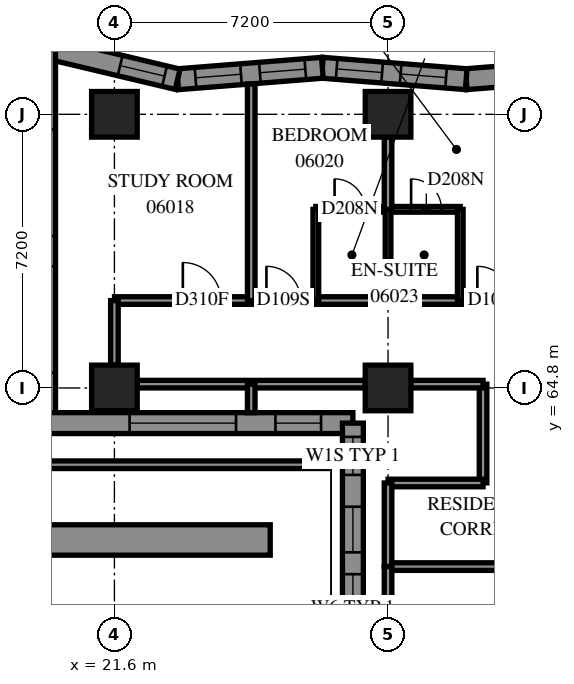
"""IFC4 building model, lengths in metres.
Left out: names, types, materials, properties, quantities, classifications, styles, units other than length and angle.
Written with IfcOpenShell. Run it as: python <this file> out.ifc"""

import sys

from ifc_helpers import new_model, si_unit, direction, frame, frame_2d, origin, origin_2d, place, context, subcontext, project, spatial, polyline, rectangle, outline, extrude, element, fill, save


model = new_model("IFC4")
c1 = context("Model", 3, precision=1e-05, world=origin(), true_north=direction((0.0, 1.0)))
c2 = subcontext(c1, "Body", "Model", "MODEL_VIEW")
j1 = project(units=[si_unit("LENGTHUNIT", "METRE"), si_unit("PLANEANGLEUNIT", "RADIAN")], contexts=[c1])
p1 = place(None, origin())
s1 = spatial("IfcSite", under=j1, at=p1, CompositionType="ELEMENT")
p2 = place(p1, origin())
s2 = spatial("IfcBuilding", under=s1, at=p2, CompositionType="ELEMENT")
p3 = place(p2, frame((0.0, 0.0, 27.0)))
s3 = spatial("IfcBuildingStorey", under=s2, at=p3, CompositionType="ELEMENT", Elevation=27.0)
for number, where, z_axis, x_axis in (
    (1, (21.6, 64.8, 0.0), (0.0, 0.0, 1.0), (1.0, 0.0, 0.0)),
    (2, (21.6, 72.0, 0.0), (0.0, 0.0, 1.0), (1.0, 0.0, 0.0)),
    (3, (28.8, 64.8, 0.0), (0.0, 0.0, 1.0), (1.0, 0.0, 0.0)),
    (4, (28.8, 72.0, 0.0), (0.0, 0.0, 1.0), (1.0, 0.0, 0.0)),
):
    element("IfcColumn", number, at=place(p3, frame(where, z_axis=z_axis, x_axis=x_axis)), inside=s3, PredefinedType="COLUMN", context=c2, shape_type="SweptSolid", body=[
        extrude(rectangle(XDim=1.2, YDim=1.2, at=origin_2d()), origin(), (0.0, 0.0, 1.0), 3.1),
    ])
p4 = place(p3, frame((34.642, 73.224, 0.0), z_axis=(0.0, 0.0, 1.0), x_axis=(-0.9968746163, -0.078999996, 0.0)))
e5 = element("IfcWall", 5, at=p4, inside=s3, PredefinedType="SOLIDWALL", context=c2, shape_type="SweptSolid", body=[
    extrude(outline(polyline([(-0.022, -0.275), (3.776, -0.275), (3.819, 0.275), (0.022, 0.275), (-0.022, -0.275)])), origin(), (0.0, 0.0, 1.0), 3.1),
])
p5 = place(p4, frame((0.636, 0.0, 0.5)))
e6 = element("IfcOpeningElement", 6, at=p5, cuts=e5, PredefinedType="OPENING", context=c2, shape_type="SweptSolid", body=[
    extrude(rectangle(XDim=1.2, YDim=2.45, at=frame_2d((0.6, 1.225))), frame((0.0, 0.285, 0.0), z_axis=(0.0, -1.0, 0.0), x_axis=(1.0, 0.0, 0.0)), (0.0, 0.0, 1.0), 0.57),
])
p6 = place(p3, frame((30.857, 72.924, 0.0), z_axis=(0.0, 0.0, 1.0), x_axis=(-0.9968747806, 0.0789979222, 0.0)))
e7 = element("IfcWall", 7, at=p6, inside=s3, PredefinedType="SOLIDWALL", context=c2, shape_type="SweptSolid", body=[
    extrude(outline(polyline([(0.022, -0.275), (3.819, -0.275), (3.776, 0.275), (-0.022, 0.275), (0.022, -0.275)])), origin(), (0.0, 0.0, 1.0), 3.1),
])
p7 = place(p6, frame((0.532, 0.0, 0.5)))
e8 = element("IfcOpeningElement", 8, at=p7, cuts=e7, PredefinedType="OPENING", context=c2, shape_type="SweptSolid", body=[
    extrude(rectangle(XDim=1.2, YDim=2.45, at=frame_2d((0.6, 1.225))), frame((0.0, 0.285, 0.0), z_axis=(0.0, -1.0, 0.0), x_axis=(1.0, 0.0, 0.0)), (0.0, 0.0, 1.0), 0.57),
])
p8 = place(p6, frame((2.22, 0.0, 0.5)))
e9 = element("IfcOpeningElement", 9, at=p8, cuts=e7, PredefinedType="OPENING", context=c2, shape_type="SweptSolid", body=[
    extrude(rectangle(XDim=1.2, YDim=2.45, at=frame_2d((0.6, 1.225))), frame((0.0, 0.285, 0.0), z_axis=(0.0, -1.0, 0.0), x_axis=(1.0, 0.0, 0.0)), (0.0, 0.0, 1.0), 0.57),
])
p9 = place(p3, frame((27.071, 73.224, 0.0), z_axis=(0.0, 0.0, 1.0), x_axis=(-0.9968745318, -0.0790010628, 0.0)))
e10 = element("IfcWall", 10, at=p9, inside=s3, PredefinedType="SOLIDWALL", context=c2, shape_type="SweptSolid", body=[
    extrude(outline(polyline([(-0.022, -0.275), (3.776, -0.275), (3.862, 0.275), (0.022, 0.275), (-0.022, -0.275)])), origin(), (0.0, 0.0, 1.0), 3.1),
])
p10 = place(p9, frame((0.449, 0.0, 0.5)))
e11 = element("IfcOpeningElement", 11, at=p10, cuts=e10, PredefinedType="OPENING", context=c2, shape_type="SweptSolid", body=[
    extrude(rectangle(XDim=1.2, YDim=2.45, at=frame_2d((0.6, 1.225))), frame((0.0, 0.285, 0.0), z_axis=(0.0, -1.0, 0.0), x_axis=(1.0, 0.0, 0.0)), (0.0, 0.0, 1.0), 0.57),
])
p11 = place(p9, frame((2.148, 0.0, 0.5)))
e12 = element("IfcOpeningElement", 12, at=p11, cuts=e10, PredefinedType="OPENING", context=c2, shape_type="SweptSolid", body=[
    extrude(rectangle(XDim=1.2, YDim=2.45, at=frame_2d((0.6, 1.225))), frame((0.0, 0.285, 0.0), z_axis=(0.0, -1.0, 0.0), x_axis=(1.0, 0.0, 0.0)), (0.0, 0.0, 1.0), 0.57),
])
p12 = place(p3, frame((23.264, 72.922, 0.0), z_axis=(0.0, 0.0, 1.0), x_axis=(-0.9728791637, 0.231313927, 0.0)))
e13 = element("IfcWall", 13, at=p12, inside=s3, PredefinedType="SOLIDWALL", context=c2, shape_type="SweptSolid", body=[
    extrude(outline(polyline([(0.043, -0.275), (3.934, -0.275), (3.238, 0.275), (-0.043, 0.275), (0.043, -0.275)])), origin(), (0.0, 0.0, 1.0), 3.1),
])
p13 = place(p12, frame((0.355, 0.0, 0.5)))
e14 = element("IfcOpeningElement", 14, at=p13, cuts=e13, PredefinedType="OPENING", context=c2, shape_type="SweptSolid", body=[
    extrude(rectangle(XDim=1.2, YDim=2.45, at=frame_2d((0.6, 1.225))), frame((0.0, 0.285, 0.0), z_axis=(0.0, -1.0, 0.0), x_axis=(1.0, 0.0, 0.0)), (0.0, 0.0, 1.0), 0.57),
])
p14 = place(p3, frame((19.775, 73.752, 0.0), z_axis=(0.0, 0.0, 1.0), x_axis=(0.0, -1.0, 0.0)))
e15 = element("IfcWall", 15, at=p14, inside=s3, PredefinedType="SOLIDWALL", context=c2, shape_type="SweptSolid", body=[
    extrude(outline(polyline([(-0.348, -0.275), (10.152, -0.275), (9.602, 0.275), (0.348, 0.275), (-0.348, -0.275)])), origin(), (0.0, 0.0, 1.0), 3.1),
])
p15 = place(p14, frame((2.152, 0.0, 0.5)))
e16 = element("IfcOpeningElement", 16, at=p15, cuts=e15, PredefinedType="OPENING", context=c2, shape_type="SweptSolid", body=[
    extrude(rectangle(XDim=2.8, YDim=2.45, at=frame_2d((1.4, 1.225))), frame((0.0, 0.285, 0.0), z_axis=(0.0, -1.0, 0.0), x_axis=(1.0, 0.0, 0.0)), (0.0, 0.0, 1.0), 0.57),
])
p16 = place(p14, frame((5.752, 0.0, 0.5)))
e17 = element("IfcOpeningElement", 17, at=p16, cuts=e15, PredefinedType="OPENING", context=c2, shape_type="SweptSolid", body=[
    extrude(rectangle(XDim=2.8, YDim=2.45, at=frame_2d((1.4, 1.225))), frame((0.0, 0.285, 0.0), z_axis=(0.0, -1.0, 0.0), x_axis=(1.0, 0.0, 0.0)), (0.0, 0.0, 1.0), 0.57),
])
p17 = place(p3, frame((19.775, 63.875, 0.0), z_axis=(0.0, 0.0, 1.0), x_axis=(1.0, 0.0, 0.0)))
e18 = element("IfcWall", 18, at=p17, inside=s3, PredefinedType="SOLIDWALL", context=c2, shape_type="SweptSolid", body=[
    extrude(outline(polyline([(-0.275, -0.275), (7.825, -0.275), (8.375, 0.275), (0.275, 0.275), (-0.275, -0.275)])), origin(), (0.0, 0.0, 1.0), 3.1),
])
p18 = place(p17, frame((2.225, 0.0, 0.5)))
e19 = element("IfcOpeningElement", 19, at=p18, cuts=e18, PredefinedType="OPENING", context=c2, shape_type="SweptSolid", body=[
    extrude(rectangle(XDim=2.8, YDim=2.45, at=frame_2d((1.4, 1.225))), frame((0.0, 0.285, 0.0), z_axis=(0.0, -1.0, 0.0), x_axis=(1.0, 0.0, 0.0)), (0.0, 0.0, 1.0), 0.57),
])
p19 = place(p17, frame((6.062, 0.0, 0.5)))
e20 = element("IfcOpeningElement", 20, at=p19, cuts=e18, PredefinedType="OPENING", context=c2, shape_type="SweptSolid", body=[
    extrude(rectangle(XDim=1.2, YDim=2.45, at=frame_2d((0.6, 1.225))), frame((0.0, 0.285, 0.0), z_axis=(0.0, -1.0, 0.0), x_axis=(1.0, 0.0, 0.0)), (0.0, 0.0, 1.0), 0.57),
])
p20 = place(p3, frame((27.875, 63.875, 0.0), z_axis=(0.0, 0.0, 1.0), x_axis=(0.0, -1.0, 0.0)))
e21 = element("IfcWall", 21, at=p20, inside=s3, PredefinedType="SOLIDWALL", context=c2, shape_type="SweptSolid", body=[
    extrude(outline(polyline([(0.275, -0.275), (7.475, -0.275), (6.925, 0.275), (-0.275, 0.275), (0.275, -0.275)])), origin(), (0.0, 0.0, 1.0), 3.1),
])
p21 = place(p20, frame((3.975, 0.0, 0.7)))
e22 = element("IfcOpeningElement", 22, at=p21, cuts=e21, PredefinedType="OPENING", context=c2, shape_type="SweptSolid", body=[
    extrude(rectangle(XDim=1.8, YDim=2.2, at=frame_2d((0.9, 1.1))), frame((0.0, 0.285, 0.0), z_axis=(0.0, -1.0, 0.0), x_axis=(1.0, 0.0, 0.0)), (0.0, 0.0, 1.0), 0.57),
])
p22 = place(p20, frame((0.362, 0.0, 0.45)))
e23 = element("IfcOpeningElement", 23, at=p22, cuts=e21, PredefinedType="OPENING", context=c2, shape_type="SweptSolid", body=[
    extrude(rectangle(XDim=1.0, YDim=2.5, at=frame_2d((0.5, 1.25))), frame((0.0, 0.285, 0.0), z_axis=(0.0, -1.0, 0.0), x_axis=(1.0, 0.0, 0.0)), (0.0, 0.0, 1.0), 0.57),
])
p23 = place(p20, frame((2.2, 0.0, 0.5)))
e24 = element("IfcOpeningElement", 24, at=p23, cuts=e21, PredefinedType="OPENING", context=c2, shape_type="SweptSolid", body=[
    extrude(rectangle(XDim=1.2, YDim=2.45, at=frame_2d((0.6, 1.225))), frame((0.0, 0.285, 0.0), z_axis=(0.0, -1.0, 0.0), x_axis=(1.0, 0.0, 0.0)), (0.0, 0.0, 1.0), 0.57),
])
p24 = place(p3, frame((28.8, 60.1, 0.0), z_axis=(0.0, 0.0, 1.0), x_axis=(1.0, 0.0, 0.0)))
e25 = element("IfcWall", 25, at=p24, inside=s3, PredefinedType="PARTITIONING", context=c2, shape_type="SweptSolid", body=[
    extrude(rectangle(XDim=24.1, YDim=0.2, at=frame_2d((12.05, 0.0))), origin(), (0.0, 0.0, 1.0), 3.1),
])
p25 = place(p24, frame((4.125, 0.0, 0.0)))
e26 = element("IfcOpeningElement", 26, at=p25, cuts=e25, PredefinedType="OPENING", context=c2, shape_type="SweptSolid", body=[
    extrude(rectangle(XDim=1.0, YDim=2.1, at=frame_2d((0.5, 1.05))), frame((0.0, 0.11, 0.0), z_axis=(0.0, -1.0, 0.0), x_axis=(1.0, 0.0, 0.0)), (0.0, 0.0, 1.0), 0.22),
])
p26 = place(p24, frame((11.62, 0.0, 0.0)))
e27 = element("IfcOpeningElement", 27, at=p26, cuts=e25, PredefinedType="OPENING", context=c2, shape_type="SweptSolid", body=[
    extrude(rectangle(XDim=0.9, YDim=2.1, at=frame_2d((0.45, 1.05))), frame((0.0, 0.11, 0.0), z_axis=(0.0, -1.0, 0.0), x_axis=(1.0, 0.0, 0.0)), (0.0, 0.0, 1.0), 0.22),
])
p27 = place(p24, frame((14.8, 0.0, 0.0)))
e28 = element("IfcOpeningElement", 28, at=p27, cuts=e25, PredefinedType="OPENING", context=c2, shape_type="SweptSolid", body=[
    extrude(rectangle(XDim=0.9, YDim=2.1, at=frame_2d((0.45, 1.05))), frame((0.0, 0.11, 0.0), z_axis=(0.0, -1.0, 0.0), x_axis=(1.0, 0.0, 0.0)), (0.0, 0.0, 1.0), 0.22),
])
p28 = place(p24, frame((18.835, 0.0, 0.0)))
e29 = element("IfcOpeningElement", 29, at=p28, cuts=e25, PredefinedType="OPENING", context=c2, shape_type="SweptSolid", body=[
    extrude(rectangle(XDim=1.0, YDim=2.1, at=frame_2d((0.5, 1.05))), frame((0.0, 0.11, 0.0), z_axis=(0.0, -1.0, 0.0), x_axis=(1.0, 0.0, 0.0)), (0.0, 0.0, 1.0), 0.22),
])
p29 = place(p24, frame((22.854, 0.0, 0.0)))
e30 = element("IfcOpeningElement", 30, at=p29, cuts=e25, PredefinedType="OPENING", context=c2, shape_type="SweptSolid", body=[
    extrude(rectangle(XDim=1.0, YDim=2.1, at=frame_2d((0.5, 1.05))), frame((0.0, 0.11, 0.0), z_axis=(0.0, -1.0, 0.0), x_axis=(1.0, 0.0, 0.0)), (0.0, 0.0, 1.0), 0.22),
])
p30 = place(p3, frame((21.602, 67.1, 0.0), z_axis=(0.0, 0.0, 1.0), x_axis=(1.0, 0.0, 0.0)))
e31 = element("IfcWall", 31, at=p30, inside=s3, PredefinedType="PARTITIONING", context=c2, shape_type="SweptSolid", body=[
    extrude(rectangle(XDim=11.898, YDim=0.2, at=frame_2d((5.949, 0.0))), origin(), (0.0, 0.0, 1.0), 3.1),
])
p31 = place(p30, frame((1.798, 0.0, 0.0)))
e32 = element("IfcOpeningElement", 32, at=p31, cuts=e31, PredefinedType="OPENING", context=c2, shape_type="SweptSolid", body=[
    extrude(rectangle(XDim=1.0, YDim=2.1, at=frame_2d((0.5, 1.05))), frame((0.0, 0.11, 0.0), z_axis=(0.0, -1.0, 0.0), x_axis=(1.0, 0.0, 0.0)), (0.0, 0.0, 1.0), 0.22),
])
p32 = place(p30, frame((3.998, 0.0, 0.0)))
e33 = element("IfcOpeningElement", 33, at=p32, cuts=e31, PredefinedType="OPENING", context=c2, shape_type="SweptSolid", body=[
    extrude(rectangle(XDim=0.9, YDim=2.1, at=frame_2d((0.45, 1.05))), frame((0.0, 0.11, 0.0), z_axis=(0.0, -1.0, 0.0), x_axis=(1.0, 0.0, 0.0)), (0.0, 0.0, 1.0), 0.22),
])
p33 = place(p30, frame((9.548, 0.0, 0.0)))
e34 = element("IfcOpeningElement", 34, at=p33, cuts=e31, PredefinedType="OPENING", context=c2, shape_type="SweptSolid", body=[
    extrude(rectangle(XDim=0.9, YDim=2.1, at=frame_2d((0.45, 1.05))), frame((0.0, 0.11, 0.0), z_axis=(0.0, -1.0, 0.0), x_axis=(1.0, 0.0, 0.0)), (0.0, 0.0, 1.0), 0.22),
])
p34 = place(p3, frame((22.2, 64.9, 0.0), z_axis=(0.0, 0.0, 1.0), x_axis=(1.0, 0.0, 0.0)))
e35 = element("IfcWall", 35, at=p34, inside=s3, PredefinedType="PARTITIONING", context=c2, shape_type="SweptSolid", body=[
    extrude(rectangle(XDim=6.0, YDim=0.2, at=frame_2d((3.0, 0.0))), origin(), (0.0, 0.0, 1.0), 2.6),
])
p35 = place(p3, frame((25.2, 67.1, 0.0), z_axis=(0.0, 0.0, 1.0), x_axis=(0.0, 1.0, 0.0)))
e36 = element("IfcWall", 36, at=p35, inside=s3, PredefinedType="PARTITIONING", context=c2, shape_type="SweptSolid", body=[
    extrude(rectangle(XDim=5.7, YDim=0.2, at=frame_2d((2.85, 0.0))), origin(), (0.0, 0.0, 1.0), 3.1),
])
p36 = place(p3, frame((26.9, 69.5, 0.0), z_axis=(0.0, 0.0, 1.0), x_axis=(1.0, 0.0, 0.0)))
e37 = element("IfcWall", 37, at=p36, inside=s3, PredefinedType="PARTITIONING", context=c2, shape_type="SweptSolid", body=[
    extrude(rectangle(XDim=3.8, YDim=0.15, at=frame_2d((1.9, 0.0))), origin(), (0.0, 0.0, 1.0), 3.1),
])
p37 = place(p36, frame((0.493, 0.0, 0.0)))
e38 = element("IfcOpeningElement", 38, at=p37, cuts=e37, PredefinedType="OPENING", context=c2, shape_type="SweptSolid", body=[
    extrude(rectangle(XDim=0.8, YDim=2.1, at=frame_2d((0.4, 1.05))), frame((0.0, 0.085, 0.0), z_axis=(0.0, -1.0, 0.0), x_axis=(1.0, 0.0, 0.0)), (0.0, 0.0, 1.0), 0.17),
])
p38 = place(p36, frame((2.507, 0.0, 0.0)))
e39 = element("IfcOpeningElement", 39, at=p38, cuts=e37, PredefinedType="OPENING", context=c2, shape_type="SweptSolid", body=[
    extrude(rectangle(XDim=0.8, YDim=2.1, at=frame_2d((0.4, 1.05))), frame((0.0, 0.085, 0.0), z_axis=(0.0, -1.0, 0.0), x_axis=(1.0, 0.0, 0.0)), (0.0, 0.0, 1.0), 0.17),
])
p39 = place(p3, frame((31.3, 62.302, 0.0), z_axis=(0.0, 0.0, 1.0), x_axis=(0.0, 1.0, 0.0)))
e40 = element("IfcWall", 40, at=p39, inside=s3, PredefinedType="PARTITIONING", context=c2, shape_type="SweptSolid", body=[
    extrude(rectangle(XDim=2.598, YDim=0.2, at=frame_2d((1.299, 0.0))), origin(), (0.0, 0.0, 1.0), 3.1),
])
p40 = place(p3, frame((28.802, 62.3, 0.0), z_axis=(0.0, 0.0, 1.0), x_axis=(1.0, 0.0, 0.0)))
e41 = element("IfcWall", 41, at=p40, inside=s3, PredefinedType="PARTITIONING", context=c2, shape_type="SweptSolid", body=[
    extrude(rectangle(XDim=2.498, YDim=0.2, at=frame_2d((1.249, 0.0))), origin(), (0.0, 0.0, 1.0), 3.1),
])
for number, where, z_axis, x_axis in (
    (42, (26.9, 67.1, 0.0), (0.0, 0.0, 1.0), (0.0, 1.0, 0.0)),
    (43, (28.8, 67.1, 0.0), (0.0, 0.0, 1.0), (0.0, 1.0, 0.0)),
    (44, (30.7, 67.1, 0.0), (0.0, 0.0, 1.0), (0.0, 1.0, 0.0)),
):
    element("IfcWall", number, at=place(p3, frame(where, z_axis=z_axis, x_axis=x_axis)), inside=s3, PredefinedType="PARTITIONING", context=c2, shape_type="SweptSolid", body=[
        extrude(rectangle(XDim=2.4, YDim=0.15, at=frame_2d((1.2, 0.0))), origin(), (0.0, 0.0, 1.0), 3.1),
    ])
p41 = place(p3, frame((28.8, 60.1, 0.0), z_axis=(0.0, 0.0, 1.0), x_axis=(0.0, 1.0, 0.0)))
e45 = element("IfcWall", 45, at=p41, inside=s3, PredefinedType="PARTITIONING", context=c2, shape_type="SweptSolid", body=[
    extrude(rectangle(XDim=2.2, YDim=0.2, at=frame_2d((1.1, 0.0))), origin(), (0.0, 0.0, 1.0), 2.6),
])
for number, where, z_axis, x_axis in (
    (46, (28.8, 69.5, 0.0), (0.0, 0.0, 1.0), (0.0, 1.0, 0.0)),
    (47, (29.4, 64.9, 0.0), (0.0, 0.0, 1.0), (1.0, 0.0, 0.0)),
):
    element("IfcWall", number, at=place(p3, frame(where, z_axis=z_axis, x_axis=x_axis)), inside=s3, PredefinedType="PARTITIONING", context=c2, shape_type="SweptSolid", body=[
        extrude(rectangle(XDim=1.9, YDim=0.2, at=frame_2d((0.95, 0.0))), origin(), (0.0, 0.0, 1.0), 3.1),
    ])
p42 = place(p3, frame((28.8, 58.2, 0.0), z_axis=(0.0, 0.0, 1.0), x_axis=(0.0, 1.0, 0.0)))
e48 = element("IfcWall", 48, at=p42, inside=s3, PredefinedType="PARTITIONING", context=c2, shape_type="SweptSolid", body=[
    extrude(rectangle(XDim=1.9, YDim=0.2, at=frame_2d((0.95, 0.0))), origin(), (0.0, 0.0, 1.0), 2.6),
])
p43 = place(p3, frame((21.6, 65.4, 0.0), z_axis=(0.0, 0.0, 1.0), x_axis=(0.0, 1.0, 0.0)))
e49 = element("IfcWall", 49, at=p43, inside=s3, PredefinedType="PARTITIONING", context=c2, shape_type="SweptSolid", body=[
    extrude(rectangle(XDim=1.698, YDim=0.2, at=frame_2d((0.849, 0.0))), origin(), (0.0, 0.0, 1.0), 2.6),
])
p44 = place(p3, frame((25.2, 64.15, 0.0), z_axis=(0.0, 0.0, 1.0), x_axis=(0.0, 1.0, 0.0)))
e50 = element("IfcWall", 50, at=p44, inside=s3, PredefinedType="PARTITIONING", context=c2, shape_type="SweptSolid", body=[
    extrude(rectangle(XDim=0.75, YDim=0.2, at=frame_2d((0.375, 0.0))), origin(), (0.0, 0.0, 1.0), 3.1),
])
p45 = place(p3, frame((28.2, 64.9, 0.0), z_axis=(0.0, 0.0, 1.0), x_axis=(1.0, 0.0, 0.0)))
e51 = element("IfcWall", 51, at=p45, inside=s3, PredefinedType="PARTITIONING", context=c2, shape_type="SweptSolid", body=[
    extrude(rectangle(XDim=1.2, YDim=0.2, at=frame_2d((0.6, 0.0))), origin(), (0.0, 0.0, 1.0), 3.1),
])
p46 = place(p3, frame((18.68, 62.78, 0.0), z_axis=(0.0, 0.0, 1.0), x_axis=(1.0, 0.0, 0.0)))
e52 = element("IfcWall", 52, at=p46, inside=s3, PredefinedType="PARAPET", context=c2, shape_type="SweptSolid", body=[
    extrude(rectangle(XDim=8.52, YDim=0.2, at=frame_2d((4.26, 0.0))), origin(), (0.0, 0.0, 1.0), 0.9),
])
p47 = place(p3, frame((0.4, 60.8, 0.0), z_axis=(0.0, 0.0, 1.0), x_axis=(1.0, 0.0, 0.0)))
e53 = element("IfcWall", 53, at=p47, inside=s3, PredefinedType="SOLIDWALL", context=c2, shape_type="SweptSolid", body=[
    extrude(rectangle(XDim=25.3, YDim=0.8, at=frame_2d((12.65, 0.0))), origin(), (0.0, 0.0, 1.0), 0.6),
])
p48 = place(p7, origin())
e54 = element("IfcWindow", 54, at=p48, inside=s3, PartitioningType="SINGLE_PANEL", PredefinedType="WINDOW", context=c2, shape_type="SweptSolid", body=[
    extrude(rectangle(XDim=1.2, YDim=2.45, at=frame_2d((0.6, 1.225))), frame((0.0, 0.155, 0.0), z_axis=(0.0, -1.0, 0.0), x_axis=(1.0, 0.0, 0.0)), (0.0, 0.0, 1.0), 0.06),
])
fill(e8, e54)
p49 = place(p8, origin())
e55 = element("IfcWindow", 55, at=p49, inside=s3, PartitioningType="SINGLE_PANEL", PredefinedType="WINDOW", context=c2, shape_type="SweptSolid", body=[
    extrude(rectangle(XDim=1.2, YDim=2.45, at=frame_2d((0.6, 1.225))), frame((0.0, 0.155, 0.0), z_axis=(0.0, -1.0, 0.0), x_axis=(1.0, 0.0, 0.0)), (0.0, 0.0, 1.0), 0.06),
])
fill(e9, e55)
p50 = place(p10, origin())
e56 = element("IfcWindow", 56, at=p50, inside=s3, PartitioningType="SINGLE_PANEL", PredefinedType="WINDOW", context=c2, shape_type="SweptSolid", body=[
    extrude(rectangle(XDim=1.2, YDim=2.45, at=frame_2d((0.6, 1.225))), frame((0.0, 0.155, 0.0), z_axis=(0.0, -1.0, 0.0), x_axis=(1.0, 0.0, 0.0)), (0.0, 0.0, 1.0), 0.06),
])
fill(e11, e56)
p51 = place(p11, origin())
e57 = element("IfcWindow", 57, at=p51, inside=s3, PartitioningType="SINGLE_PANEL", PredefinedType="WINDOW", context=c2, shape_type="SweptSolid", body=[
    extrude(rectangle(XDim=1.2, YDim=2.45, at=frame_2d((0.6, 1.225))), frame((0.0, 0.155, 0.0), z_axis=(0.0, -1.0, 0.0), x_axis=(1.0, 0.0, 0.0)), (0.0, 0.0, 1.0), 0.06),
])
fill(e12, e57)
p52 = place(p13, origin())
e58 = element("IfcWindow", 58, at=p52, inside=s3, PartitioningType="SINGLE_PANEL", PredefinedType="WINDOW", context=c2, shape_type="SweptSolid", body=[
    extrude(rectangle(XDim=1.2, YDim=2.45, at=frame_2d((0.6, 1.225))), frame((0.0, 0.155, 0.0), z_axis=(0.0, -1.0, 0.0), x_axis=(1.0, 0.0, 0.0)), (0.0, 0.0, 1.0), 0.06),
])
fill(e14, e58)
p53 = place(p18, origin())
e59 = element("IfcWindow", 59, at=p53, inside=s3, PartitioningType="SINGLE_PANEL", PredefinedType="WINDOW", context=c2, shape_type="SweptSolid", body=[
    extrude(rectangle(XDim=2.8, YDim=2.45, at=frame_2d((1.4, 1.225))), frame((0.0, 0.155, 0.0), z_axis=(0.0, -1.0, 0.0), x_axis=(1.0, 0.0, 0.0)), (0.0, 0.0, 1.0), 0.06),
])
fill(e19, e59)
p54 = place(p19, origin())
e60 = element("IfcWindow", 60, at=p54, inside=s3, PartitioningType="SINGLE_PANEL", PredefinedType="WINDOW", context=c2, shape_type="SweptSolid", body=[
    extrude(rectangle(XDim=1.2, YDim=2.45, at=frame_2d((0.6, 1.225))), frame((0.0, 0.155, 0.0), z_axis=(0.0, -1.0, 0.0), x_axis=(1.0, 0.0, 0.0)), (0.0, 0.0, 1.0), 0.06),
])
fill(e20, e60)
p55 = place(p31, origin())
e61 = element("IfcDoor", 61, at=p55, inside=s3, OperationType="SINGLE_SWING_RIGHT", PredefinedType="DOOR", context=c2, shape_type="SweptSolid", body=[
    extrude(rectangle(XDim=1.0, YDim=2.1, at=frame_2d((0.5, 1.05))), frame((0.0, 0.025, 0.0), z_axis=(0.0, -1.0, 0.0), x_axis=(1.0, 0.0, 0.0)), (0.0, 0.0, 1.0), 0.05),
])
fill(e32, e61)
p56 = place(p32, origin())
e62 = element("IfcDoor", 62, at=p56, inside=s3, OperationType="SINGLE_SWING_LEFT", PredefinedType="DOOR", context=c2, shape_type="SweptSolid", body=[
    extrude(rectangle(XDim=0.9, YDim=2.1, at=frame_2d((0.45, 1.05))), frame((0.0, 0.025, 0.0), z_axis=(0.0, -1.0, 0.0), x_axis=(1.0, 0.0, 0.0)), (0.0, 0.0, 1.0), 0.05),
])
fill(e33, e62)
p57 = place(p37, origin())
e63 = element("IfcDoor", 63, at=p57, inside=s3, OperationType="SINGLE_SWING_RIGHT", PredefinedType="DOOR", context=c2, shape_type="SweptSolid", body=[
    extrude(rectangle(XDim=0.8, YDim=2.1, at=frame_2d((0.4, 1.05))), frame((0.0, 0.025, 0.0), z_axis=(0.0, -1.0, 0.0), x_axis=(1.0, 0.0, 0.0)), (0.0, 0.0, 1.0), 0.05),
])
fill(e38, e63)
p58 = place(p33, origin())
e64 = element("IfcDoor", 64, at=p58, inside=s3, OperationType="SINGLE_SWING_RIGHT", PredefinedType="DOOR", context=c2, shape_type="SweptSolid", body=[
    extrude(rectangle(XDim=0.9, YDim=2.1, at=frame_2d((0.45, 1.05))), frame((0.0, 0.025, 0.0), z_axis=(0.0, -1.0, 0.0), x_axis=(1.0, 0.0, 0.0)), (0.0, 0.0, 1.0), 0.05),
])
fill(e34, e64)
p59 = place(p38, origin())
e65 = element("IfcDoor", 65, at=p59, inside=s3, OperationType="SINGLE_SWING_RIGHT", PredefinedType="DOOR", context=c2, shape_type="SweptSolid", body=[
    extrude(rectangle(XDim=0.8, YDim=2.1, at=frame_2d((0.4, 1.05))), frame((0.0, 0.025, 0.0), z_axis=(0.0, -1.0, 0.0), x_axis=(1.0, 0.0, 0.0)), (0.0, 0.0, 1.0), 0.05),
])
fill(e39, e65)
p60 = place(p21, origin())
e66 = element("IfcWindow", 66, at=p60, inside=s3, PartitioningType="SINGLE_PANEL", PredefinedType="WINDOW", context=c2, shape_type="SweptSolid", body=[
    extrude(rectangle(XDim=1.8, YDim=2.2, at=frame_2d((0.9, 1.1))), frame((0.0, 0.155, 0.0), z_axis=(0.0, -1.0, 0.0), x_axis=(1.0, 0.0, 0.0)), (0.0, 0.0, 1.0), 0.06),
])
fill(e22, e66)
p61 = place(p22, origin())
e67 = element("IfcWindow", 67, at=p61, inside=s3, PartitioningType="SINGLE_PANEL", PredefinedType="WINDOW", context=c2, shape_type="SweptSolid", body=[
    extrude(rectangle(XDim=1.0, YDim=2.5, at=frame_2d((0.5, 1.25))), frame((0.0, 0.155, 0.0), z_axis=(0.0, -1.0, 0.0), x_axis=(1.0, 0.0, 0.0)), (0.0, 0.0, 1.0), 0.06),
])
fill(e23, e67)
p62 = place(p23, origin())
e68 = element("IfcWindow", 68, at=p62, inside=s3, PartitioningType="SINGLE_PANEL", PredefinedType="WINDOW", context=c2, shape_type="SweptSolid", body=[
    extrude(rectangle(XDim=1.2, YDim=2.45, at=frame_2d((0.6, 1.225))), frame((0.0, 0.155, 0.0), z_axis=(0.0, -1.0, 0.0), x_axis=(1.0, 0.0, 0.0)), (0.0, 0.0, 1.0), 0.06),
])
fill(e24, e68)
save(model, sys.argv[1])
